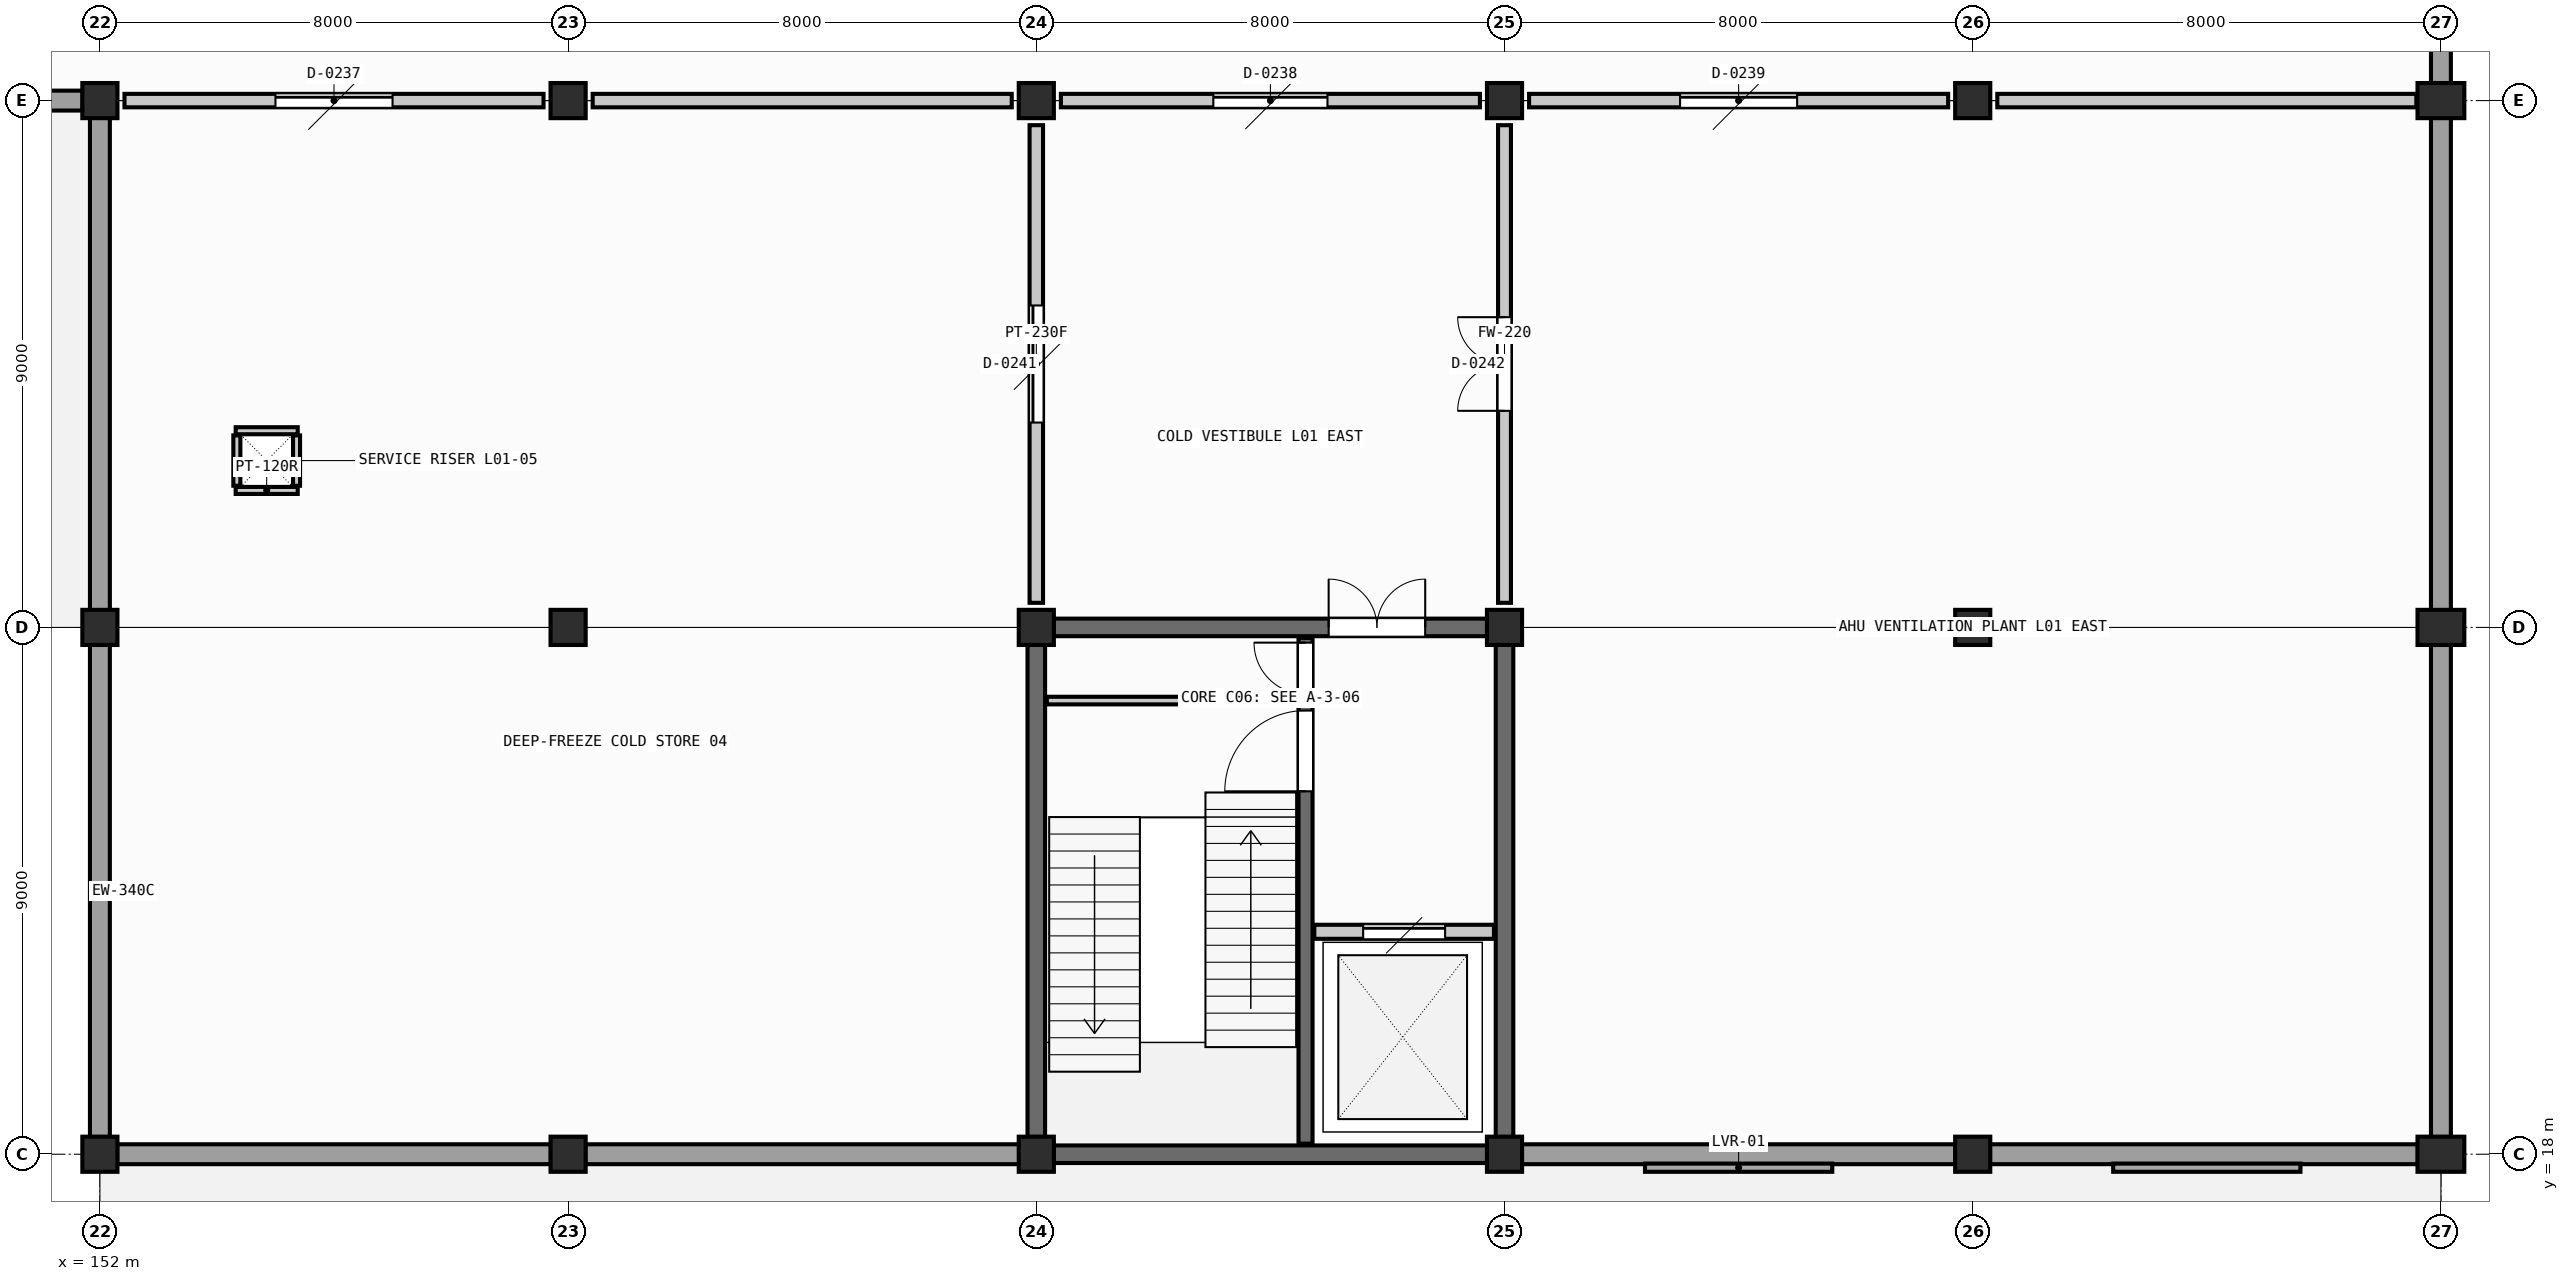
"""IFC4 building model, lengths in metres.
Left out: names, types, materials, properties, quantities, classifications, styles, units other than length and angle.
Written with IfcOpenShell. Run it as: python <this file> out.ifc"""

import sys

from ifc_helpers import new_model, si_unit, direction, frame, frame_2d, origin, origin_2d, place, context, subcontext, project, spatial, rectangle, extrude, element, fill, save


model = new_model("IFC4")
c1 = context("Model", 3, precision=1e-05, world=origin(), true_north=direction((0.0, 1.0)))
c2 = subcontext(c1, "Body", "Model", "MODEL_VIEW")
j1 = project(units=[si_unit("LENGTHUNIT", "METRE"), si_unit("PLANEANGLEUNIT", "RADIAN")], contexts=[c1])
p1 = place(None, origin())
s1 = spatial("IfcSite", under=j1, at=p1, CompositionType="ELEMENT")
p2 = place(p1, origin())
s2 = spatial("IfcBuilding", under=s1, at=p2, CompositionType="ELEMENT")
p3 = place(p2, frame((0.0, 0.0, 4.8)))
s3 = spatial("IfcBuildingStorey", under=s2, at=p3, CompositionType="ELEMENT", Elevation=4.8)
for number, where, z_axis, x_axis in (
    (1, (152.0, 18.0, 0.0), (0.0, 0.0, 1.0), (1.0, 0.0, 0.0)),
    (2, (152.0, 27.0, 0.0), (0.0, 0.0, 1.0), (1.0, 0.0, 0.0)),
    (3, (152.0, 36.0, 0.0), (0.0, 0.0, 1.0), (1.0, 0.0, 0.0)),
    (4, (160.0, 18.0, 0.0), (0.0, 0.0, 1.0), (1.0, 0.0, 0.0)),
    (5, (160.0, 27.0, 0.0), (0.0, 0.0, 1.0), (1.0, 0.0, 0.0)),
    (6, (160.0, 36.0, 0.0), (0.0, 0.0, 1.0), (1.0, 0.0, 0.0)),
    (7, (168.0, 18.0, 0.0), (0.0, 0.0, 1.0), (1.0, 0.0, 0.0)),
    (8, (168.0, 27.0, 0.0), (0.0, 0.0, 1.0), (1.0, 0.0, 0.0)),
    (9, (168.0, 36.0, 0.0), (0.0, 0.0, 1.0), (1.0, 0.0, 0.0)),
    (10, (176.0, 18.0, 0.0), (0.0, 0.0, 1.0), (1.0, 0.0, 0.0)),
    (11, (176.0, 27.0, 0.0), (0.0, 0.0, 1.0), (1.0, 0.0, 0.0)),
    (12, (176.0, 36.0, 0.0), (0.0, 0.0, 1.0), (1.0, 0.0, 0.0)),
    (13, (184.0, 18.0, 0.0), (0.0, 0.0, 1.0), (1.0, 0.0, 0.0)),
    (14, (184.0, 27.0, 0.0), (0.0, 0.0, 1.0), (1.0, 0.0, 0.0)),
    (15, (184.0, 36.0, 0.0), (0.0, 0.0, 1.0), (1.0, 0.0, 0.0)),
):
    element("IfcColumn", number, at=place(p3, frame(where, z_axis=z_axis, x_axis=x_axis)), inside=s3, PredefinedType="COLUMN", context=c2, shape_type="SweptSolid", body=[
        extrude(rectangle(XDim=0.6, YDim=0.6, at=origin_2d()), origin(), (0.0, 0.0, 1.0), 4.2),
    ])
for number, where, z_axis, x_axis in (
    (16, (192.0, 18.0, 0.0), (0.0, 0.0, 1.0), (1.0, 0.0, 0.0)),
    (17, (192.0, 27.0, 0.0), (0.0, 0.0, 1.0), (1.0, 0.0, 0.0)),
    (18, (192.0, 36.0, 0.0), (0.0, 0.0, 1.0), (1.0, 0.0, 0.0)),
):
    element("IfcColumn", number, at=place(p3, frame(where, z_axis=z_axis, x_axis=x_axis)), inside=s3, PredefinedType="COLUMN", context=c2, shape_type="SweptSolid", body=[
        extrude(rectangle(XDim=0.8, YDim=0.6, at=origin_2d()), origin(), (0.0, 0.0, 1.0), 4.2),
    ])
for number, where, z_axis, x_axis in (
    (19, (154.32, 29.34, 0.0), (0.0, 0.0, 1.0), (1.0, 0.0, 0.0)),
    (20, (154.32, 30.36, 0.0), (0.0, 0.0, 1.0), (1.0, 0.0, 0.0)),
):
    element("IfcWall", number, at=place(p3, frame(where, z_axis=z_axis, x_axis=x_axis)), inside=s3, PredefinedType="PARTITIONING", context=c2, shape_type="SweptSolid", body=[
        extrude(rectangle(XDim=1.06, YDim=0.12, at=frame_2d((0.53, 0.0))), origin(), (0.0, 0.0, 1.0), 2.95),
    ])
for number, where, z_axis, x_axis in (
    (21, (154.34, 29.42, 0.0), (0.0, 0.0, 1.0), (0.0, 1.0, 0.0)),
    (22, (155.36, 29.42, 0.0), (0.0, 0.0, 1.0), (0.0, 1.0, 0.0)),
):
    element("IfcWall", number, at=place(p3, frame(where, z_axis=z_axis, x_axis=x_axis)), inside=s3, PredefinedType="PARTITIONING", context=c2, shape_type="SweptSolid", body=[
        extrude(rectangle(XDim=0.86, YDim=0.12, at=frame_2d((0.43, 0.0))), origin(), (0.0, 0.0, 1.0), 2.95),
    ])
for number, where, z_axis, x_axis in (
    (23, (152.295, 18.0, 0.0), (0.0, 0.0, 1.0), (1.0, 0.0, 0.0)),
    (24, (160.295, 18.0, 0.0), (0.0, 0.0, 1.0), (1.0, 0.0, 0.0)),
    (25, (176.295, 18.0, 0.0), (0.0, 0.0, 1.0), (1.0, 0.0, 0.0)),
):
    element("IfcWall", number, at=place(p3, frame(where, z_axis=z_axis, x_axis=x_axis)), inside=s3, PredefinedType="SOLIDWALL", context=c2, shape_type="SweptSolid", body=[
        extrude(rectangle(XDim=7.41, YDim=0.34, at=frame_2d((3.705, 0.0))), origin(), (0.0, 0.0, 1.0), 3.05),
    ])
p4 = place(p3, frame((184.295, 18.0, 0.0), z_axis=(0.0, 0.0, 1.0), x_axis=(1.0, 0.0, 0.0)))
e26 = element("IfcWall", 26, at=p4, inside=s3, PredefinedType="SOLIDWALL", context=c2, shape_type="SweptSolid", body=[
    extrude(rectangle(XDim=7.31, YDim=0.34, at=frame_2d((3.655, 0.0))), origin(), (0.0, 0.0, 1.0), 3.05),
])
p5 = place(p3, frame((144.295, 36.0, 0.0), z_axis=(0.0, 0.0, 1.0), x_axis=(1.0, 0.0, 0.0)))
e27 = element("IfcWall", 27, at=p5, inside=s3, PredefinedType="SOLIDWALL", context=c2, shape_type="SweptSolid", body=[
    extrude(rectangle(XDim=7.41, YDim=0.34, at=frame_2d((3.705, 0.0))), origin(), (0.0, 0.0, 1.0), 3.05),
])
for number, where, z_axis, x_axis in (
    (28, (152.0, 26.705, 0.0), (0.0, 0.0, 1.0), (0.0, -1.0, 0.0)),
    (29, (152.0, 35.705, 0.0), (0.0, 0.0, 1.0), (0.0, -1.0, 0.0)),
    (30, (192.0, 18.295, 0.0), (0.0, 0.0, 1.0), (0.0, 1.0, 0.0)),
    (31, (192.0, 27.295, 0.0), (0.0, 0.0, 1.0), (0.0, 1.0, 0.0)),
    (32, (192.0, 36.295, 0.0), (0.0, 0.0, 1.0), (0.0, 1.0, 0.0)),
):
    element("IfcWall", number, at=place(p3, frame(where, z_axis=z_axis, x_axis=x_axis)), inside=s3, PredefinedType="SOLIDWALL", context=c2, shape_type="SweptSolid", body=[
        extrude(rectangle(XDim=8.41, YDim=0.34, at=frame_2d((4.205, 0.0))), origin(), (0.0, 0.0, 1.0), 3.05),
    ])
p6 = place(p3, frame((168.295, 18.0, 0.0), z_axis=(0.0, 0.0, 1.0), x_axis=(1.0, 0.0, 0.0)))
e33 = element("IfcWall", 33, at=p6, inside=s3, PredefinedType="SHEAR", context=c2, shape_type="SweptSolid", body=[
    extrude(rectangle(XDim=7.41, YDim=0.3, at=frame_2d((3.705, 0.0))), origin(), (0.0, 0.0, 1.0), 3.945),
])
p7 = place(p3, frame((168.295, 27.0, 0.0), z_axis=(0.0, 0.0, 1.0), x_axis=(1.0, 0.0, 0.0)))
e34 = element("IfcWall", 34, at=p7, inside=s3, PredefinedType="SHEAR", context=c2, shape_type="SweptSolid", body=[
    extrude(rectangle(XDim=7.41, YDim=0.3, at=frame_2d((3.705, 0.0))), origin(), (0.0, 0.0, 1.0), 3.945),
])
p8 = place(p7, frame((4.7, 0.0, 0.0)))
e35 = element("IfcOpeningElement", 35, at=p8, cuts=e34, PredefinedType="OPENING", context=c2, shape_type="SweptSolid", body=[
    extrude(rectangle(XDim=1.65, YDim=2.22, at=frame_2d((0.825, 1.11))), frame((0.0, 0.16, 0.0), z_axis=(0.0, -1.0, 0.0), x_axis=(1.0, 0.0, 0.0)), (0.0, 0.0, 1.0), 0.32),
])
for number, where, z_axis, x_axis in (
    (36, (168.0, 18.295, 0.0), (0.0, 0.0, 1.0), (0.0, 1.0, 0.0)),
    (37, (176.0, 18.295, 0.0), (0.0, 0.0, 1.0), (0.0, 1.0, 0.0)),
):
    element("IfcWall", number, at=place(p3, frame(where, z_axis=z_axis, x_axis=x_axis)), inside=s3, PredefinedType="SHEAR", context=c2, shape_type="SweptSolid", body=[
        extrude(rectangle(XDim=8.41, YDim=0.3, at=frame_2d((4.205, 0.0))), origin(), (0.0, 0.0, 1.0), 3.945),
    ])
p9 = place(p3, frame((172.6, 18.18, 0.0), z_axis=(0.0, 0.0, 1.0), x_axis=(0.0, 1.0, 0.0)))
e38 = element("IfcWall", 38, at=p9, inside=s3, PredefinedType="SHEAR", context=c2, shape_type="SweptSolid", body=[
    extrude(rectangle(XDim=8.64, YDim=0.24, at=frame_2d((4.32, 0.0))), origin(), (0.0, 0.0, 1.0), 3.945),
])
p10 = place(p9, frame((6.02, 0.0, 0.0)))
e39 = element("IfcOpeningElement", 39, at=p10, cuts=e38, PredefinedType="OPENING", context=c2, shape_type="SweptSolid", body=[
    extrude(rectangle(XDim=1.38, YDim=2.22, at=frame_2d((0.69, 1.11))), frame((0.0, 0.13, 0.0), z_axis=(0.0, -1.0, 0.0), x_axis=(1.0, 0.0, 0.0)), (0.0, 0.0, 1.0), 0.26),
])
p11 = place(p9, frame((7.68, 0.0, 0.0)))
e40 = element("IfcOpeningElement", 40, at=p11, cuts=e38, PredefinedType="OPENING", context=c2, shape_type="SweptSolid", body=[
    extrude(rectangle(XDim=0.88, YDim=2.02, at=frame_2d((0.44, 1.01))), frame((0.0, 0.13, 0.0), z_axis=(0.0, -1.0, 0.0), x_axis=(1.0, 0.0, 0.0)), (0.0, 0.0, 1.0), 0.26),
])
p12 = place(p3, frame((168.18, 25.75, 0.0), z_axis=(0.0, 0.0, 1.0), x_axis=(1.0, 0.0, 0.0)))
e41 = element("IfcWall", 41, at=p12, inside=s3, PredefinedType="PARTITIONING", context=c2, shape_type="SweptSolid", body=[
    extrude(rectangle(XDim=4.28, YDim=0.13, at=frame_2d((2.14, 0.0))), origin(), (0.0, 0.0, 1.0), 3.295),
])
p13 = place(p3, frame((172.75, 21.8, 0.0), z_axis=(0.0, 0.0, 1.0), x_axis=(1.0, 0.0, 0.0)))
e42 = element("IfcWall", 42, at=p13, inside=s3, PredefinedType="SHEAR", context=c2, shape_type="SweptSolid", body=[
    extrude(rectangle(XDim=3.07, YDim=0.24, at=frame_2d((1.535, 0.0))), origin(), (0.0, 0.0, 1.0), 3.295),
])
p14 = place(p13, frame((0.835, 0.0, 0.0)))
e43 = element("IfcOpeningElement", 43, at=p14, cuts=e42, PredefinedType="OPENING", context=c2, shape_type="SweptSolid", body=[
    extrude(rectangle(XDim=1.4, YDim=2.3, at=frame_2d((0.7, 1.15))), frame((0.0, 0.13, 0.0), z_axis=(0.0, -1.0, 0.0), x_axis=(1.0, 0.0, 0.0)), (0.0, 0.0, 1.0), 0.26),
])
p15 = place(p3, frame((152.42, 36.0, 0.0), z_axis=(0.0, 0.0, 1.0), x_axis=(1.0, 0.0, 0.0)))
e44 = element("IfcWall", 44, at=p15, inside=s3, PredefinedType="PARTITIONING", context=c2, shape_type="SweptSolid", body=[
    extrude(rectangle(XDim=7.16, YDim=0.23, at=frame_2d((3.58, 0.0))), origin(), (0.0, 0.0, 1.0), 3.05),
])
p16 = place(p15, frame((2.58, 0.0, 0.0)))
e45 = element("IfcOpeningElement", 45, at=p16, cuts=e44, PredefinedType="OPENING", context=c2, shape_type="SweptSolid", body=[
    extrude(rectangle(XDim=2.0, YDim=2.5, at=frame_2d((1.0, 1.25))), frame((0.0, 0.125, 0.0), z_axis=(0.0, -1.0, 0.0), x_axis=(1.0, 0.0, 0.0)), (0.0, 0.0, 1.0), 0.25),
])
p17 = place(p3, frame((160.42, 36.0, 0.0), z_axis=(0.0, 0.0, 1.0), x_axis=(1.0, 0.0, 0.0)))
e46 = element("IfcWall", 46, at=p17, inside=s3, PredefinedType="PARTITIONING", context=c2, shape_type="SweptSolid", body=[
    extrude(rectangle(XDim=7.16, YDim=0.23, at=frame_2d((3.58, 0.0))), origin(), (0.0, 0.0, 1.0), 3.05),
])
p18 = place(p3, frame((168.42, 36.0, 0.0), z_axis=(0.0, 0.0, 1.0), x_axis=(1.0, 0.0, 0.0)))
e47 = element("IfcWall", 47, at=p18, inside=s3, PredefinedType="PARTITIONING", context=c2, shape_type="SweptSolid", body=[
    extrude(rectangle(XDim=7.16, YDim=0.23, at=frame_2d((3.58, 0.0))), origin(), (0.0, 0.0, 1.0), 3.05),
])
p19 = place(p18, frame((2.605, 0.0, 0.0)))
e48 = element("IfcOpeningElement", 48, at=p19, cuts=e47, PredefinedType="OPENING", context=c2, shape_type="SweptSolid", body=[
    extrude(rectangle(XDim=1.95, YDim=2.45, at=frame_2d((0.975, 1.225))), frame((0.0, 0.125, 0.0), z_axis=(0.0, -1.0, 0.0), x_axis=(1.0, 0.0, 0.0)), (0.0, 0.0, 1.0), 0.25),
])
p20 = place(p3, frame((176.42, 36.0, 0.0), z_axis=(0.0, 0.0, 1.0), x_axis=(1.0, 0.0, 0.0)))
e49 = element("IfcWall", 49, at=p20, inside=s3, PredefinedType="PARTITIONING", context=c2, shape_type="SweptSolid", body=[
    extrude(rectangle(XDim=7.16, YDim=0.23, at=frame_2d((3.58, 0.0))), origin(), (0.0, 0.0, 1.0), 3.05),
])
p21 = place(p20, frame((2.58, 0.0, 0.0)))
e50 = element("IfcOpeningElement", 50, at=p21, cuts=e49, PredefinedType="OPENING", context=c2, shape_type="SweptSolid", body=[
    extrude(rectangle(XDim=2.0, YDim=2.5, at=frame_2d((1.0, 1.25))), frame((0.0, 0.125, 0.0), z_axis=(0.0, -1.0, 0.0), x_axis=(1.0, 0.0, 0.0)), (0.0, 0.0, 1.0), 0.25),
])
p22 = place(p3, frame((184.42, 36.0, 0.0), z_axis=(0.0, 0.0, 1.0), x_axis=(1.0, 0.0, 0.0)))
e51 = element("IfcWall", 51, at=p22, inside=s3, PredefinedType="PARTITIONING", context=c2, shape_type="SweptSolid", body=[
    extrude(rectangle(XDim=7.16, YDim=0.23, at=frame_2d((3.58, 0.0))), origin(), (0.0, 0.0, 1.0), 3.05),
])
p23 = place(p3, frame((168.0, 27.42, 0.0), z_axis=(0.0, 0.0, 1.0), x_axis=(0.0, 1.0, 0.0)))
e52 = element("IfcWall", 52, at=p23, inside=s3, PredefinedType="PARTITIONING", context=c2, shape_type="SweptSolid", body=[
    extrude(rectangle(XDim=8.16, YDim=0.23, at=frame_2d((4.08, 0.0))), origin(), (0.0, 0.0, 1.0), 3.05),
])
p24 = place(p23, frame((3.08, 0.0, 0.0)))
e53 = element("IfcOpeningElement", 53, at=p24, cuts=e52, PredefinedType="OPENING", context=c2, shape_type="SweptSolid", body=[
    extrude(rectangle(XDim=2.0, YDim=2.5, at=frame_2d((1.0, 1.25))), frame((0.0, 0.125, 0.0), z_axis=(0.0, -1.0, 0.0), x_axis=(1.0, 0.0, 0.0)), (0.0, 0.0, 1.0), 0.25),
])
p25 = place(p3, frame((176.0, 27.42, 0.0), z_axis=(0.0, 0.0, 1.0), x_axis=(0.0, 1.0, 0.0)))
e54 = element("IfcWall", 54, at=p25, inside=s3, PredefinedType="SOLIDWALL", context=c2, shape_type="SweptSolid", body=[
    extrude(rectangle(XDim=8.16, YDim=0.22, at=frame_2d((4.08, 0.0))), origin(), (0.0, 0.0, 1.0), 3.05),
])
p26 = place(p25, frame((3.28, 0.0, 0.0)))
e55 = element("IfcOpeningElement", 55, at=p26, cuts=e54, PredefinedType="OPENING", context=c2, shape_type="SweptSolid", body=[
    extrude(rectangle(XDim=1.6, YDim=2.28, at=frame_2d((0.8, 1.14))), frame((0.0, 0.12, 0.0), z_axis=(0.0, -1.0, 0.0), x_axis=(1.0, 0.0, 0.0)), (0.0, 0.0, 1.0), 0.24),
])
p27 = place(p10, origin())
e56 = element("IfcDoor", 56, at=p27, inside=s3, OperationType="SINGLE_SWING_LEFT", PredefinedType="DOOR", context=c2, shape_type="SweptSolid", body=[
    extrude(rectangle(XDim=1.38, YDim=2.22, at=frame_2d((0.69, 1.11))), frame((0.0, 0.025, 0.0), z_axis=(0.0, -1.0, 0.0), x_axis=(1.0, 0.0, 0.0)), (0.0, 0.0, 1.0), 0.05),
])
fill(e39, e56)
p28 = place(p11, origin())
e57 = element("IfcDoor", 57, at=p28, inside=s3, OperationType="SINGLE_SWING_RIGHT", PredefinedType="DOOR", context=c2, shape_type="SweptSolid", body=[
    extrude(rectangle(XDim=0.88, YDim=2.02, at=frame_2d((0.44, 1.01))), frame((0.0, 0.025, 0.0), z_axis=(0.0, -1.0, 0.0), x_axis=(1.0, 0.0, 0.0)), (0.0, 0.0, 1.0), 0.05),
])
fill(e40, e57)
p29 = place(p8, origin())
e58 = element("IfcDoor", 58, at=p29, inside=s3, OperationType="DOUBLE_DOOR_SINGLE_SWING", PredefinedType="DOOR", context=c2, shape_type="SweptSolid", body=[
    extrude(rectangle(XDim=1.65, YDim=2.22, at=frame_2d((0.825, 1.11))), frame((0.0, 0.025, 0.0), z_axis=(0.0, -1.0, 0.0), x_axis=(1.0, 0.0, 0.0)), (0.0, 0.0, 1.0), 0.05),
])
fill(e35, e58)
p30 = place(p14, origin())
e59 = element("IfcDoor", 59, at=p30, inside=s3, OperationType="SLIDING_TO_LEFT", PredefinedType="DOOR", context=c2, shape_type="SweptSolid", body=[
    extrude(rectangle(XDim=1.4, YDim=2.3, at=frame_2d((0.7, 1.15))), frame((0.0, 0.025, 0.0), z_axis=(0.0, -1.0, 0.0), x_axis=(1.0, 0.0, 0.0)), (0.0, 0.0, 1.0), 0.05),
])
fill(e43, e59)
p31 = place(p16, origin())
e60 = element("IfcDoor", 60, at=p31, inside=s3, OperationType="SLIDING_TO_LEFT", PredefinedType="DOOR", context=c2, shape_type="SweptSolid", body=[
    extrude(rectangle(XDim=2.0, YDim=2.5, at=frame_2d((1.0, 1.25))), frame((0.0, 0.025, 0.0), z_axis=(0.0, -1.0, 0.0), x_axis=(1.0, 0.0, 0.0)), (0.0, 0.0, 1.0), 0.05),
])
fill(e45, e60)
p32 = place(p19, origin())
e61 = element("IfcDoor", 61, at=p32, inside=s3, OperationType="SLIDING_TO_LEFT", PredefinedType="DOOR", context=c2, shape_type="SweptSolid", body=[
    extrude(rectangle(XDim=1.95, YDim=2.45, at=frame_2d((0.975, 1.225))), frame((0.0, 0.025, 0.0), z_axis=(0.0, -1.0, 0.0), x_axis=(1.0, 0.0, 0.0)), (0.0, 0.0, 1.0), 0.05),
])
fill(e48, e61)
p33 = place(p21, origin())
e62 = element("IfcDoor", 62, at=p33, inside=s3, OperationType="SLIDING_TO_LEFT", PredefinedType="DOOR", context=c2, shape_type="SweptSolid", body=[
    extrude(rectangle(XDim=2.0, YDim=2.5, at=frame_2d((1.0, 1.25))), frame((0.0, 0.025, 0.0), z_axis=(0.0, -1.0, 0.0), x_axis=(1.0, 0.0, 0.0)), (0.0, 0.0, 1.0), 0.05),
])
fill(e50, e62)
p34 = place(p24, origin())
e63 = element("IfcDoor", 63, at=p34, inside=s3, OperationType="SLIDING_TO_LEFT", PredefinedType="DOOR", context=c2, shape_type="SweptSolid", body=[
    extrude(rectangle(XDim=2.0, YDim=2.5, at=frame_2d((1.0, 1.25))), frame((0.0, 0.025, 0.0), z_axis=(0.0, -1.0, 0.0), x_axis=(1.0, 0.0, 0.0)), (0.0, 0.0, 1.0), 0.05),
])
fill(e53, e63)
p35 = place(p26, origin())
e64 = element("IfcDoor", 64, at=p35, inside=s3, OperationType="DOUBLE_DOOR_SINGLE_SWING", PredefinedType="DOOR", context=c2, shape_type="SweptSolid", body=[
    extrude(rectangle(XDim=1.6, YDim=2.28, at=frame_2d((0.8, 1.14))), frame((0.0, 0.025, 0.0), z_axis=(0.0, -1.0, 0.0), x_axis=(1.0, 0.0, 0.0)), (0.0, 0.0, 1.0), 0.05),
])
fill(e55, e64)
save(model, sys.argv[1])
